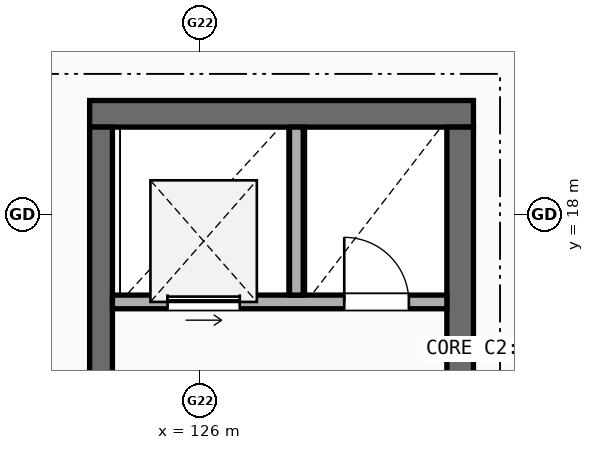
"""IFC4 building model, lengths in metres.
Left out: names, types, materials, properties, quantities, classifications, styles, units other than length and angle.
Written with IfcOpenShell. Run it as: python <this file> out.ifc"""

import sys

from ifc_helpers import new_model, si_unit, direction, frame, frame_2d, origin, place, context, subcontext, project, spatial, rectangle, extrude, element, fill, save


model = new_model("IFC4")
c1 = context("Model", 3, precision=1e-05, world=origin(), true_north=direction((0.0, 1.0)))
c2 = subcontext(c1, "Body", "Model", "MODEL_VIEW")
j1 = project(units=[si_unit("LENGTHUNIT", "METRE"), si_unit("PLANEANGLEUNIT", "RADIAN")], contexts=[c1])
p1 = place(None, origin())
s1 = spatial("IfcSite", under=j1, at=p1, CompositionType="ELEMENT")
p2 = place(p1, origin())
s2 = spatial("IfcBuilding", under=s1, at=p2, CompositionType="ELEMENT")
p3 = place(p2, frame((0.0, 0.0, 7.7)))
s3 = spatial("IfcBuildingStorey", under=s2, at=p3, CompositionType="ELEMENT", Elevation=7.7)
p4 = place(p3, frame((129.6, 19.325, 0.0), z_axis=(0.0, 0.0, 1.0), x_axis=(-1.0, 0.0, 0.0)))
e1 = element("IfcWall", 1, at=p4, inside=s3, PredefinedType="SHEAR", context=c2, shape_type="SweptSolid", body=[
    extrude(rectangle(XDim=5.05, YDim=0.35, at=frame_2d((2.525, 0.0))), origin(), (0.0, 0.0, 1.0), 2.955),
])
p5 = place(p3, frame((129.425, 12.75, 0.0), z_axis=(0.0, 0.0, 1.0), x_axis=(0.0, 1.0, 0.0)))
e2 = element("IfcWall", 2, at=p5, inside=s3, PredefinedType="SHEAR", context=c2, shape_type="SweptSolid", body=[
    extrude(rectangle(XDim=6.4, YDim=0.35, at=frame_2d((3.2, 0.0))), origin(), (0.0, 0.0, 1.0), 2.955),
])
p6 = place(p3, frame((124.7, 15.7, 0.0), z_axis=(0.0, 0.0, 1.0), x_axis=(0.0, 1.0, 0.0)))
e3 = element("IfcWall", 3, at=p6, inside=s3, PredefinedType="SHEAR", context=c2, shape_type="SweptSolid", body=[
    extrude(rectangle(XDim=3.45, YDim=0.3, at=frame_2d((1.725, 0.0))), origin(), (0.0, 0.0, 1.0), 2.955),
])
p7 = place(p3, frame((124.85, 16.85, 0.0), z_axis=(0.0, 0.0, 1.0), x_axis=(1.0, 0.0, 0.0)))
e4 = element("IfcWall", 4, at=p7, inside=s3, PredefinedType="SOLIDWALL", context=c2, shape_type="SweptSolid", body=[
    extrude(rectangle(XDim=4.4, YDim=0.18, at=frame_2d((2.2, 0.0))), origin(), (0.0, 0.0, 1.0), 2.955),
])
p8 = place(p7, frame((0.725, 0.0, 0.0)))
e5 = element("IfcOpeningElement", 5, at=p8, cuts=e4, PredefinedType="OPENING", context=c2, shape_type="SweptSolid", body=[
    extrude(rectangle(XDim=0.95, YDim=2.15, at=frame_2d((0.475, 1.075))), frame((0.0, 0.1, 0.0), z_axis=(0.0, -1.0, 0.0), x_axis=(1.0, 0.0, 0.0)), (0.0, 0.0, 1.0), 0.2),
])
p9 = place(p7, frame((3.05, 0.0, 0.0)))
e6 = element("IfcOpeningElement", 6, at=p9, cuts=e4, PredefinedType="OPENING", context=c2, shape_type="SweptSolid", body=[
    extrude(rectangle(XDim=0.85, YDim=2.1, at=frame_2d((0.425, 1.05))), frame((0.0, 0.1, 0.0), z_axis=(0.0, -1.0, 0.0), x_axis=(1.0, 0.0, 0.0)), (0.0, 0.0, 1.0), 0.2),
])
p10 = place(p3, frame((127.27, 16.94, 0.0), z_axis=(0.0, 0.0, 1.0), x_axis=(0.0, 1.0, 0.0)))
e7 = element("IfcWall", 7, at=p10, inside=s3, PredefinedType="SOLIDWALL", context=c2, shape_type="SweptSolid", body=[
    extrude(rectangle(XDim=2.21, YDim=0.18, at=frame_2d((1.105, 0.0))), origin(), (0.0, 0.0, 1.0), 2.955),
])
p11 = place(p8, origin())
e8 = element("IfcDoor", 8, at=p11, inside=s3, OperationType="SLIDING_TO_LEFT", PredefinedType="DOOR", context=c2, shape_type="SweptSolid", body=[
    extrude(rectangle(XDim=0.95, YDim=2.15, at=frame_2d((0.475, 1.075))), frame((0.0, 0.025, 0.0), z_axis=(0.0, -1.0, 0.0), x_axis=(1.0, 0.0, 0.0)), (0.0, 0.0, 1.0), 0.05),
])
fill(e5, e8)
p12 = place(p9, frame((0.85, 0.0, 0.0), z_axis=(0.0, 0.0, 1.0), x_axis=(-1.0, 0.0, 0.0)))
e9 = element("IfcDoor", 9, at=p12, inside=s3, OperationType="SINGLE_SWING_LEFT", PredefinedType="DOOR", context=c2, shape_type="SweptSolid", body=[
    extrude(rectangle(XDim=0.85, YDim=2.1, at=frame_2d((0.425, 1.05))), frame((0.0, 0.025, 0.0), z_axis=(0.0, -1.0, 0.0), x_axis=(1.0, 0.0, 0.0)), (0.0, 0.0, 1.0), 0.05),
])
fill(e6, e9)
save(model, sys.argv[1])
